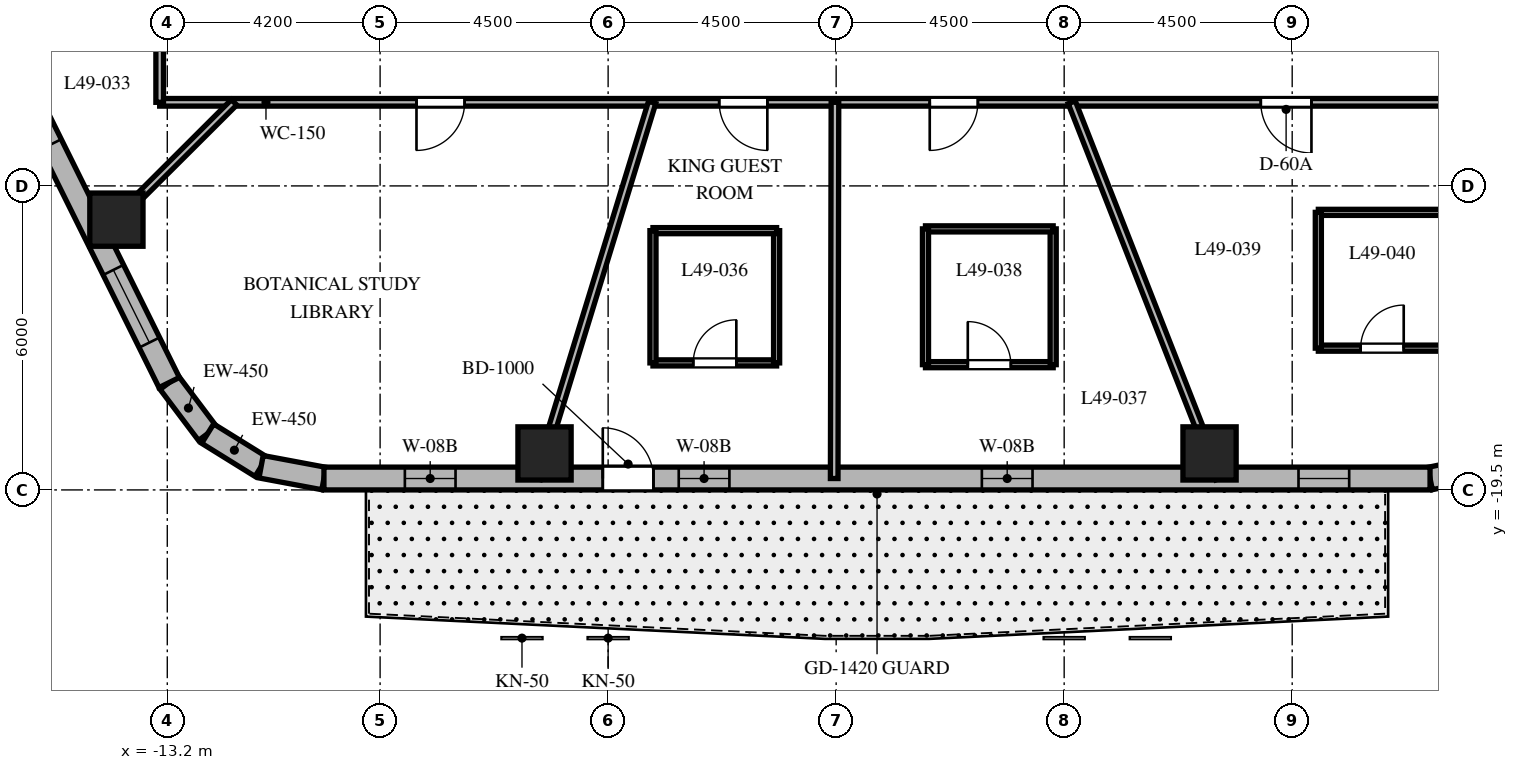
"""IFC4 building model, lengths in metres.
Left out: names, types, materials, properties, quantities, classifications, styles, units other than length and angle.
Written with IfcOpenShell. Run it as: python <this file> out.ifc"""

import sys

from ifc_helpers import new_model, si_unit, direction, frame, frame_2d, origin, origin_2d, place, context, subcontext, project, spatial, rectangle, extrude, element, fill, save


model = new_model("IFC4")
c1 = context("Model", 3, precision=1e-05, world=origin(), true_north=direction((0.0, 1.0)))
c2 = subcontext(c1, "Body", "Model", "MODEL_VIEW")
j1 = project(units=[si_unit("LENGTHUNIT", "METRE"), si_unit("PLANEANGLEUNIT", "RADIAN")], contexts=[c1])
p1 = place(None, origin())
s1 = spatial("IfcSite", under=j1, at=p1, CompositionType="ELEMENT")
p2 = place(p1, origin())
s2 = spatial("IfcBuilding", under=s1, at=p2, CompositionType="ELEMENT")
p3 = place(p2, frame((0.0, 0.0, 197.8)))
s3 = spatial("IfcBuildingStorey", under=s2, at=p3, CompositionType="ELEMENT", Elevation=197.8)
for number, where, z_axis, x_axis in (
    (1, (-5.755, -18.78, 0.0), (0.0, 0.0, 1.0), (1.0, 0.0, 0.0)),
    (2, (7.369, -18.78, 0.0), (0.0, 0.0, 1.0), (1.0, 0.0, 0.0)),
    (3, (-14.204, -14.166, 0.0), (0.0, 0.0, 1.0), (1.0, 0.0, 0.0)),
):
    element("IfcColumn", number, at=place(p3, frame(where, z_axis=z_axis, x_axis=x_axis)), inside=s3, PredefinedType="COLUMN", context=c2, shape_type="SweptSolid", body=[
        extrude(rectangle(XDim=1.05, YDim=1.05, at=origin_2d()), origin(), (0.0, 0.0, 1.0), 3.7),
    ])
p4 = place(p3, frame((-13.162, -17.381, 0.0), z_axis=(0.0, 0.0, 1.0), x_axis=(0.601515770517, -0.798860925205, 0.0)))
e4 = element("IfcWall", 4, at=p4, inside=s3, PredefinedType="SOLIDWALL", context=c2, shape_type="SweptSolid", body=[
    extrude(rectangle(XDim=1.262, YDim=0.45, at=frame_2d((0.631, 0.0))), origin(), (0.0, 0.0, 1.0), 3.35),
])
p5 = place(p3, frame((-12.403, -18.389, 0.0), z_axis=(0.0, 0.0, 1.0), x_axis=(0.849795170926, -0.527113049991, 0.0)))
e5 = element("IfcWall", 5, at=p5, inside=s3, PredefinedType="SOLIDWALL", context=c2, shape_type="SweptSolid", body=[
    extrude(rectangle(XDim=1.241, YDim=0.45, at=frame_2d((0.62, 0.0))), origin(), (0.0, 0.0, 1.0), 3.35),
])
p6 = place(p3, frame((-11.349, -19.043, 0.0), z_axis=(0.0, 0.0, 1.0), x_axis=(0.982931267051, -0.183973161772, 0.0)))
e6 = element("IfcWall", 6, at=p6, inside=s3, PredefinedType="SOLIDWALL", context=c2, shape_type="SweptSolid", body=[
    extrude(rectangle(XDim=1.262, YDim=0.45, at=frame_2d((0.631, 0.0))), origin(), (0.0, 0.0, 1.0), 3.35),
])
p7 = place(p3, frame((11.72, -19.275, 0.0), z_axis=(0.0, 0.0, 1.0), x_axis=(0.97893106758, 0.204191001093, 0.0)))
e7 = element("IfcWall", 7, at=p7, inside=s3, PredefinedType="SOLIDWALL", context=c2, shape_type="SweptSolid", body=[
    extrude(rectangle(XDim=1.4, YDim=0.45, at=frame_2d((0.7, 0.0))), origin(), (0.0, 0.0, 1.0), 3.35),
])
p8 = place(p3, frame((-10.108, -19.275, 0.0), z_axis=(0.0, 0.0, 1.0), x_axis=(1.0, 0.0, 0.0)))
e8 = element("IfcWall", 8, at=p8, inside=s3, PredefinedType="SOLIDWALL", context=c2, shape_type="SweptSolid", body=[
    extrude(rectangle(XDim=21.829, YDim=0.45, at=frame_2d((10.915, 0.0))), origin(), (0.0, 0.0, 1.0), 3.35),
])
p9 = place(p8, frame((5.503, 0.0, 0.0)))
e9 = element("IfcOpeningElement", 9, at=p9, cuts=e8, PredefinedType="OPENING", context=c2, shape_type="SweptSolid", body=[
    extrude(rectangle(XDim=1.0, YDim=2.15, at=frame_2d((0.5, 1.075))), frame((0.0, 0.235, 0.0), z_axis=(0.0, -1.0, 0.0), x_axis=(1.0, 0.0, 0.0)), (0.0, 0.0, 1.0), 0.47),
])
p10 = place(p8, frame((1.597, 0.0, 0.8)))
e10 = element("IfcOpeningElement", 10, at=p10, cuts=e8, PredefinedType="OPENING", context=c2, shape_type="SweptSolid", body=[
    extrude(rectangle(XDim=1.0, YDim=1.35, at=frame_2d((0.5, 0.675))), frame((0.0, 0.235, 0.0), z_axis=(0.0, -1.0, 0.0), x_axis=(1.0, 0.0, 0.0)), (0.0, 0.0, 1.0), 0.47),
])
p11 = place(p8, frame((7.002, 0.0, 0.8)))
e11 = element("IfcOpeningElement", 11, at=p11, cuts=e8, PredefinedType="OPENING", context=c2, shape_type="SweptSolid", body=[
    extrude(rectangle(XDim=1.0, YDim=1.35, at=frame_2d((0.5, 0.675))), frame((0.0, 0.235, 0.0), z_axis=(0.0, -1.0, 0.0), x_axis=(1.0, 0.0, 0.0)), (0.0, 0.0, 1.0), 0.47),
])
p12 = place(p8, frame((12.984, 0.0, 0.8)))
e12 = element("IfcOpeningElement", 12, at=p12, cuts=e8, PredefinedType="OPENING", context=c2, shape_type="SweptSolid", body=[
    extrude(rectangle(XDim=1.0, YDim=1.35, at=frame_2d((0.5, 0.675))), frame((0.0, 0.235, 0.0), z_axis=(0.0, -1.0, 0.0), x_axis=(1.0, 0.0, 0.0)), (0.0, 0.0, 1.0), 0.47),
])
p13 = place(p8, frame((19.233, 0.0, 0.8)))
e13 = element("IfcOpeningElement", 13, at=p13, cuts=e8, PredefinedType="OPENING", context=c2, shape_type="SweptSolid", body=[
    extrude(rectangle(XDim=1.0, YDim=1.35, at=frame_2d((0.5, 0.675))), frame((0.0, 0.235, 0.0), z_axis=(0.0, -1.0, 0.0), x_axis=(1.0, 0.0, 0.0)), (0.0, 0.0, 1.0), 0.47),
])
p14 = place(p3, frame((-20.618, -2.344, 0.0), z_axis=(0.0, 0.0, 1.0), x_axis=(0.444243691097, -0.895905990002, 0.0)))
e14 = element("IfcWall", 14, at=p14, inside=s3, PredefinedType="SOLIDWALL", context=c2, shape_type="SweptSolid", body=[
    extrude(rectangle(XDim=16.784, YDim=0.45, at=frame_2d((8.392, 0.0))), origin(), (0.0, 0.0, 1.0), 3.35),
])
p15 = place(p14, frame((0.931, 0.0, 0.8)))
e15 = element("IfcOpeningElement", 15, at=p15, cuts=e14, PredefinedType="OPENING", context=c2, shape_type="SweptSolid", body=[
    extrude(rectangle(XDim=1.6, YDim=1.75, at=frame_2d((0.8, 0.875))), frame((0.0, 0.235, 0.0), z_axis=(0.0, -1.0, 0.0), x_axis=(1.0, 0.0, 0.0)), (0.0, 0.0, 1.0), 0.47),
])
p16 = place(p14, frame((5.245, 0.0, 0.8)))
e16 = element("IfcOpeningElement", 16, at=p16, cuts=e14, PredefinedType="OPENING", context=c2, shape_type="SweptSolid", body=[
    extrude(rectangle(XDim=1.6, YDim=1.75, at=frame_2d((0.8, 0.875))), frame((0.0, 0.235, 0.0), z_axis=(0.0, -1.0, 0.0), x_axis=(1.0, 0.0, 0.0)), (0.0, 0.0, 1.0), 0.47),
])
p17 = place(p14, frame((9.936, 0.0, 0.8)))
e17 = element("IfcOpeningElement", 17, at=p17, cuts=e14, PredefinedType="OPENING", context=c2, shape_type="SweptSolid", body=[
    extrude(rectangle(XDim=1.6, YDim=1.75, at=frame_2d((0.8, 0.875))), frame((0.0, 0.235, 0.0), z_axis=(0.0, -1.0, 0.0), x_axis=(1.0, 0.0, 0.0)), (0.0, 0.0, 1.0), 0.47),
])
p18 = place(p14, frame((14.303, 0.0, 0.8)))
e18 = element("IfcOpeningElement", 18, at=p18, cuts=e14, PredefinedType="OPENING", context=c2, shape_type="SweptSolid", body=[
    extrude(rectangle(XDim=1.6, YDim=1.75, at=frame_2d((0.8, 0.875))), frame((0.0, 0.235, 0.0), z_axis=(0.0, -1.0, 0.0), x_axis=(1.0, 0.0, 0.0)), (0.0, 0.0, 1.0), 0.47),
])
p19 = place(p3, frame((13.35, -11.85, 0.0), z_axis=(0.0, 0.0, 1.0), x_axis=(-1.0, 0.0, 0.0)))
e19 = element("IfcWall", 19, at=p19, inside=s3, PredefinedType="PARTITIONING", context=c2, shape_type="SweptSolid", body=[
    extrude(rectangle(XDim=26.7, YDim=0.15, at=frame_2d((13.35, 0.0))), origin(), (0.0, 0.0, 1.0), 2.14),
])
p20 = place(p19, frame((20.682, 0.0, 0.0)))
e20 = element("IfcOpeningElement", 20, at=p20, cuts=e19, PredefinedType="OPENING", context=c2, shape_type="SweptSolid", body=[
    extrude(rectangle(XDim=0.95, YDim=2.03, at=frame_2d((0.475, 1.015))), frame((0.0, 0.085, 0.0), z_axis=(0.0, -1.0, 0.0), x_axis=(1.0, 0.0, 0.0)), (0.0, 0.0, 1.0), 0.17),
])
p21 = place(p19, frame((14.708, 0.0, 0.0)))
e21 = element("IfcOpeningElement", 21, at=p21, cuts=e19, PredefinedType="OPENING", context=c2, shape_type="SweptSolid", body=[
    extrude(rectangle(XDim=0.95, YDim=2.03, at=frame_2d((0.475, 1.015))), frame((0.0, 0.085, 0.0), z_axis=(0.0, -1.0, 0.0), x_axis=(1.0, 0.0, 0.0)), (0.0, 0.0, 1.0), 0.17),
])
p22 = place(p19, frame((10.553, 0.0, 0.0)))
e22 = element("IfcOpeningElement", 22, at=p22, cuts=e19, PredefinedType="OPENING", context=c2, shape_type="SweptSolid", body=[
    extrude(rectangle(XDim=0.95, YDim=2.03, at=frame_2d((0.475, 1.015))), frame((0.0, 0.085, 0.0), z_axis=(0.0, -1.0, 0.0), x_axis=(1.0, 0.0, 0.0)), (0.0, 0.0, 1.0), 0.17),
])
p23 = place(p19, frame((3.97, 0.0, 0.0)))
e23 = element("IfcOpeningElement", 23, at=p23, cuts=e19, PredefinedType="OPENING", context=c2, shape_type="SweptSolid", body=[
    extrude(rectangle(XDim=1.0, YDim=2.03, at=frame_2d((0.5, 1.015))), frame((0.0, 0.085, 0.0), z_axis=(0.0, -1.0, 0.0), x_axis=(1.0, 0.0, 0.0)), (0.0, 0.0, 1.0), 0.17),
])
p24 = place(p3, frame((-13.35, -11.85, 0.0), z_axis=(0.0, 0.0, 1.0), x_axis=(0.0, 1.0, 0.0)))
e24 = element("IfcWall", 24, at=p24, inside=s3, PredefinedType="PARTITIONING", context=c2, shape_type="SweptSolid", body=[
    extrude(rectangle(XDim=23.7, YDim=0.15, at=frame_2d((11.85, 0.0))), origin(), (0.0, 0.0, 1.0), 2.79),
])
p25 = place(p24, frame((20.136, 0.0, 0.0)))
e25 = element("IfcOpeningElement", 25, at=p25, cuts=e24, PredefinedType="OPENING", context=c2, shape_type="SweptSolid", body=[
    extrude(rectangle(XDim=0.9, YDim=2.03, at=frame_2d((0.45, 1.015))), frame((0.0, 0.085, 0.0), z_axis=(0.0, -1.0, 0.0), x_axis=(1.0, 0.0, 0.0)), (0.0, 0.0, 1.0), 0.17),
])
p26 = place(p24, frame((15.551, 0.0, 0.0)))
e26 = element("IfcOpeningElement", 26, at=p26, cuts=e24, PredefinedType="OPENING", context=c2, shape_type="SweptSolid", body=[
    extrude(rectangle(XDim=0.9, YDim=2.03, at=frame_2d((0.45, 1.015))), frame((0.0, 0.085, 0.0), z_axis=(0.0, -1.0, 0.0), x_axis=(1.0, 0.0, 0.0)), (0.0, 0.0, 1.0), 0.17),
])
p27 = place(p24, frame((10.751, 0.0, 0.0)))
e27 = element("IfcOpeningElement", 27, at=p27, cuts=e24, PredefinedType="OPENING", context=c2, shape_type="SweptSolid", body=[
    extrude(rectangle(XDim=0.95, YDim=2.03, at=frame_2d((0.475, 1.015))), frame((0.0, 0.085, 0.0), z_axis=(0.0, -1.0, 0.0), x_axis=(1.0, 0.0, 0.0)), (0.0, 0.0, 1.0), 0.17),
])
p28 = place(p24, frame((5.677, 0.0, 0.0)))
e28 = element("IfcOpeningElement", 28, at=p28, cuts=e24, PredefinedType="OPENING", context=c2, shape_type="SweptSolid", body=[
    extrude(rectangle(XDim=0.9, YDim=2.03, at=frame_2d((0.45, 1.015))), frame((0.0, 0.085, 0.0), z_axis=(0.0, -1.0, 0.0), x_axis=(1.0, 0.0, 0.0)), (0.0, 0.0, 1.0), 0.17),
])
p29 = place(p24, frame((1.721, 0.0, 0.0)))
e29 = element("IfcOpeningElement", 29, at=p29, cuts=e24, PredefinedType="OPENING", context=c2, shape_type="SweptSolid", body=[
    extrude(rectangle(XDim=0.9, YDim=2.03, at=frame_2d((0.45, 1.015))), frame((0.0, 0.085, 0.0), z_axis=(0.0, -1.0, 0.0), x_axis=(1.0, 0.0, 0.0)), (0.0, 0.0, 1.0), 0.17),
])
p30 = place(p3, frame((-11.882, -11.85, 0.0), z_axis=(0.0, 0.0, 1.0), x_axis=(-0.708037373639, -0.706174962407, 0.0)))
e30 = element("IfcWall", 30, at=p30, inside=s3, PredefinedType="PARTITIONING", context=c2, shape_type="SweptSolid", body=[
    extrude(rectangle(XDim=3.802, YDim=0.15, at=frame_2d((1.901, 0.0))), origin(), (0.0, 0.0, 1.0), 2.59),
])
p31 = place(p3, frame((-3.631, -11.85, 0.0), z_axis=(0.0, 0.0, 1.0), x_axis=(-0.293007573338, -0.956110120209, 0.0)))
e31 = element("IfcWall", 31, at=p31, inside=s3, PredefinedType="PARTITIONING", context=c2, shape_type="SweptSolid", body=[
    extrude(rectangle(XDim=7.766, YDim=0.15, at=frame_2d((3.883, 0.0))), origin(), (0.0, 0.0, 1.0), 2.14),
])
p32 = place(p3, frame((-0.024, -11.85, 0.0), z_axis=(0.0, 0.0, 1.0), x_axis=(-0.001972901592, -0.999998053828, 0.0)))
e32 = element("IfcWall", 32, at=p32, inside=s3, PredefinedType="PARTITIONING", context=c2, shape_type="SweptSolid", body=[
    extrude(rectangle(XDim=7.425, YDim=0.15, at=frame_2d((3.712, 0.0))), origin(), (0.0, 0.0, 1.0), 2.59),
])
p33 = place(p3, frame((4.65, -11.85, 0.0), z_axis=(0.0, 0.0, 1.0), x_axis=(0.365265947993, -0.930903210456, 0.0)))
e33 = element("IfcWall", 33, at=p33, inside=s3, PredefinedType="PARTITIONING", context=c2, shape_type="SweptSolid", body=[
    extrude(rectangle(XDim=7.976, YDim=0.15, at=frame_2d((3.988, 0.0))), origin(), (0.0, 0.0, 1.0), 2.14),
])
p34 = place(p3, frame((-3.615, -16.993, 0.0), z_axis=(0.0, 0.0, 1.0), x_axis=(1.0, 0.0, 0.0)))
e34 = element("IfcWall", 34, at=p34, inside=s3, PredefinedType="PARTITIONING", context=c2, shape_type="SweptSolid", body=[
    extrude(rectangle(XDim=2.44, YDim=0.12, at=frame_2d((1.22, 0.0))), origin(), (0.0, 0.0, 1.0), 3.35),
])
p35 = place(p34, frame((0.795, 0.0, 0.0)))
e35 = element("IfcOpeningElement", 35, at=p35, cuts=e34, PredefinedType="OPENING", context=c2, shape_type="SweptSolid", body=[
    extrude(rectangle(XDim=0.85, YDim=2.03, at=frame_2d((0.425, 1.015))), frame((0.0, 0.07, 0.0), z_axis=(0.0, -1.0, 0.0), x_axis=(1.0, 0.0, 0.0)), (0.0, 0.0, 1.0), 0.14),
])
p36 = place(p3, frame((-1.175, -16.993, 0.0), z_axis=(0.0, 0.0, 1.0), x_axis=(0.0, 1.0, 0.0)))
e36 = element("IfcWall", 36, at=p36, inside=s3, PredefinedType="PARTITIONING", context=c2, shape_type="SweptSolid", body=[
    extrude(rectangle(XDim=2.61, YDim=0.12, at=frame_2d((1.305, 0.0))), origin(), (0.0, 0.0, 1.0), 2.791),
])
p37 = place(p3, frame((-1.175, -14.383, 0.0), z_axis=(0.0, 0.0, 1.0), x_axis=(-1.0, 0.0, 0.0)))
e37 = element("IfcWall", 37, at=p37, inside=s3, PredefinedType="PARTITIONING", context=c2, shape_type="SweptSolid", body=[
    extrude(rectangle(XDim=2.44, YDim=0.12, at=frame_2d((1.22, 0.0))), origin(), (0.0, 0.0, 1.0), 3.35),
])
p38 = place(p3, frame((-3.615, -14.383, 0.0), z_axis=(0.0, 0.0, 1.0), x_axis=(0.0, -1.0, 0.0)))
e38 = element("IfcWall", 38, at=p38, inside=s3, PredefinedType="PARTITIONING", context=c2, shape_type="SweptSolid", body=[
    extrude(rectangle(XDim=2.61, YDim=0.12, at=frame_2d((1.305, 0.0))), origin(), (0.0, 0.0, 1.0), 2.791),
])
p39 = place(p3, frame((1.763, -17.028, 0.0), z_axis=(0.0, 0.0, 1.0), x_axis=(1.0, 0.0, 0.0)))
e39 = element("IfcWall", 39, at=p39, inside=s3, PredefinedType="PARTITIONING", context=c2, shape_type="SweptSolid", body=[
    extrude(rectangle(XDim=2.52, YDim=0.12, at=frame_2d((1.26, 0.0))), origin(), (0.0, 0.0, 1.0), 2.14),
])
p40 = place(p39, frame((0.835, 0.0, 0.0)))
e40 = element("IfcOpeningElement", 40, at=p40, cuts=e39, PredefinedType="OPENING", context=c2, shape_type="SweptSolid", body=[
    extrude(rectangle(XDim=0.85, YDim=2.03, at=frame_2d((0.425, 1.015))), frame((0.0, 0.07, 0.0), z_axis=(0.0, -1.0, 0.0), x_axis=(1.0, 0.0, 0.0)), (0.0, 0.0, 1.0), 0.14),
])
p41 = place(p3, frame((4.283, -17.028, 0.0), z_axis=(0.0, 0.0, 1.0), x_axis=(0.0, 1.0, 0.0)))
e41 = element("IfcWall", 41, at=p41, inside=s3, PredefinedType="PARTITIONING", context=c2, shape_type="SweptSolid", body=[
    extrude(rectangle(XDim=2.68, YDim=0.12, at=frame_2d((1.34, 0.0))), origin(), (0.0, 0.0, 1.0), 2.14),
])
p42 = place(p3, frame((4.283, -14.348, 0.0), z_axis=(0.0, 0.0, 1.0), x_axis=(-1.0, 0.0, 0.0)))
e42 = element("IfcWall", 42, at=p42, inside=s3, PredefinedType="PARTITIONING", context=c2, shape_type="SweptSolid", body=[
    extrude(rectangle(XDim=2.52, YDim=0.12, at=frame_2d((1.26, 0.0))), origin(), (0.0, 0.0, 1.0), 2.14),
])
p43 = place(p3, frame((1.763, -14.348, 0.0), z_axis=(0.0, 0.0, 1.0), x_axis=(0.0, -1.0, 0.0)))
e43 = element("IfcWall", 43, at=p43, inside=s3, PredefinedType="PARTITIONING", context=c2, shape_type="SweptSolid", body=[
    extrude(rectangle(XDim=2.68, YDim=0.12, at=frame_2d((1.34, 0.0))), origin(), (0.0, 0.0, 1.0), 2.791),
])
p44 = place(p3, frame((9.516, -16.702, 0.0), z_axis=(0.0, 0.0, 1.0), x_axis=(1.0, 0.0, 0.0)))
e44 = element("IfcWall", 44, at=p44, inside=s3, PredefinedType="PARTITIONING", context=c2, shape_type="SweptSolid", body=[
    extrude(rectangle(XDim=2.52, YDim=0.12, at=frame_2d((1.26, 0.0))), origin(), (0.0, 0.0, 1.0), 2.59),
])
p45 = place(p44, frame((0.835, 0.0, 0.0)))
e45 = element("IfcOpeningElement", 45, at=p45, cuts=e44, PredefinedType="OPENING", context=c2, shape_type="SweptSolid", body=[
    extrude(rectangle(XDim=0.85, YDim=2.03, at=frame_2d((0.425, 1.015))), frame((0.0, 0.07, 0.0), z_axis=(0.0, -1.0, 0.0), x_axis=(1.0, 0.0, 0.0)), (0.0, 0.0, 1.0), 0.14),
])
p46 = place(p3, frame((12.036, -14.022, 0.0), z_axis=(0.0, 0.0, 1.0), x_axis=(-1.0, 0.0, 0.0)))
e46 = element("IfcWall", 46, at=p46, inside=s3, PredefinedType="PARTITIONING", context=c2, shape_type="SweptSolid", body=[
    extrude(rectangle(XDim=2.52, YDim=0.12, at=frame_2d((1.26, 0.0))), origin(), (0.0, 0.0, 1.0), 2.876),
])
p47 = place(p3, frame((9.516, -14.022, 0.0), z_axis=(0.0, 0.0, 1.0), x_axis=(0.0, -1.0, 0.0)))
e47 = element("IfcWall", 47, at=p47, inside=s3, PredefinedType="PARTITIONING", context=c2, shape_type="SweptSolid", body=[
    extrude(rectangle(XDim=2.68, YDim=0.12, at=frame_2d((1.34, 0.0))), origin(), (0.0, 0.0, 1.0), 2.876),
])
p48 = place(p9, origin())
e48 = element("IfcDoor", 48, at=p48, inside=s3, OperationType="SINGLE_SWING_LEFT", PredefinedType="DOOR", context=c2, shape_type="SweptSolid", body=[
    extrude(rectangle(XDim=1.0, YDim=2.15, at=frame_2d((0.5, 1.075))), frame((0.0, 0.025, 0.0), z_axis=(0.0, -1.0, 0.0), x_axis=(1.0, 0.0, 0.0)), (0.0, 0.0, 1.0), 0.05),
])
fill(e9, e48)
p49 = place(p10, origin())
e49 = element("IfcWindow", 49, at=p49, inside=s3, PartitioningType="SINGLE_PANEL", PredefinedType="WINDOW", context=c2, shape_type="SweptSolid", body=[
    extrude(rectangle(XDim=1.0, YDim=1.35, at=frame_2d((0.5, 0.675))), frame((0.0, 0.03, 0.0), z_axis=(0.0, -1.0, 0.0), x_axis=(1.0, 0.0, 0.0)), (0.0, 0.0, 1.0), 0.06),
])
fill(e10, e49)
p50 = place(p11, origin())
e50 = element("IfcWindow", 50, at=p50, inside=s3, PartitioningType="SINGLE_PANEL", PredefinedType="WINDOW", context=c2, shape_type="SweptSolid", body=[
    extrude(rectangle(XDim=1.0, YDim=1.35, at=frame_2d((0.5, 0.675))), frame((0.0, 0.03, 0.0), z_axis=(0.0, -1.0, 0.0), x_axis=(1.0, 0.0, 0.0)), (0.0, 0.0, 1.0), 0.06),
])
fill(e11, e50)
p51 = place(p12, origin())
e51 = element("IfcWindow", 51, at=p51, inside=s3, PartitioningType="SINGLE_PANEL", PredefinedType="WINDOW", context=c2, shape_type="SweptSolid", body=[
    extrude(rectangle(XDim=1.0, YDim=1.35, at=frame_2d((0.5, 0.675))), frame((0.0, 0.03, 0.0), z_axis=(0.0, -1.0, 0.0), x_axis=(1.0, 0.0, 0.0)), (0.0, 0.0, 1.0), 0.06),
])
fill(e12, e51)
p52 = place(p13, origin())
e52 = element("IfcWindow", 52, at=p52, inside=s3, PartitioningType="SINGLE_PANEL", PredefinedType="WINDOW", context=c2, shape_type="SweptSolid", body=[
    extrude(rectangle(XDim=1.0, YDim=1.35, at=frame_2d((0.5, 0.675))), frame((0.0, 0.03, 0.0), z_axis=(0.0, -1.0, 0.0), x_axis=(1.0, 0.0, 0.0)), (0.0, 0.0, 1.0), 0.06),
])
fill(e13, e52)
p53 = place(p17, origin())
e53 = element("IfcWindow", 53, at=p53, inside=s3, PartitioningType="SINGLE_PANEL", PredefinedType="WINDOW", context=c2, shape_type="SweptSolid", body=[
    extrude(rectangle(XDim=1.6, YDim=1.75, at=frame_2d((0.8, 0.875))), frame((0.0, 0.03, 0.0), z_axis=(0.0, -1.0, 0.0), x_axis=(1.0, 0.0, 0.0)), (0.0, 0.0, 1.0), 0.06),
])
fill(e17, e53)
p54 = place(p18, origin())
e54 = element("IfcWindow", 54, at=p54, inside=s3, PartitioningType="SINGLE_PANEL", PredefinedType="WINDOW", context=c2, shape_type="SweptSolid", body=[
    extrude(rectangle(XDim=1.6, YDim=1.75, at=frame_2d((0.8, 0.875))), frame((0.0, 0.03, 0.0), z_axis=(0.0, -1.0, 0.0), x_axis=(1.0, 0.0, 0.0)), (0.0, 0.0, 1.0), 0.06),
])
fill(e18, e54)
p55 = place(p20, origin())
e55 = element("IfcDoor", 55, at=p55, inside=s3, OperationType="SINGLE_SWING_RIGHT", PredefinedType="DOOR", context=c2, shape_type="SweptSolid", body=[
    extrude(rectangle(XDim=0.95, YDim=2.03, at=frame_2d((0.475, 1.015))), frame((0.0, 0.025, 0.0), z_axis=(0.0, -1.0, 0.0), x_axis=(1.0, 0.0, 0.0)), (0.0, 0.0, 1.0), 0.05),
])
fill(e20, e55)
p56 = place(p21, origin())
e56 = element("IfcDoor", 56, at=p56, inside=s3, OperationType="SINGLE_SWING_LEFT", PredefinedType="DOOR", context=c2, shape_type="SweptSolid", body=[
    extrude(rectangle(XDim=0.95, YDim=2.03, at=frame_2d((0.475, 1.015))), frame((0.0, 0.025, 0.0), z_axis=(0.0, -1.0, 0.0), x_axis=(1.0, 0.0, 0.0)), (0.0, 0.0, 1.0), 0.05),
])
fill(e21, e56)
p57 = place(p35, origin())
e57 = element("IfcDoor", 57, at=p57, inside=s3, OperationType="SINGLE_SWING_RIGHT", PredefinedType="DOOR", context=c2, shape_type="SweptSolid", body=[
    extrude(rectangle(XDim=0.85, YDim=2.03, at=frame_2d((0.425, 1.015))), frame((0.0, 0.025, 0.0), z_axis=(0.0, -1.0, 0.0), x_axis=(1.0, 0.0, 0.0)), (0.0, 0.0, 1.0), 0.05),
])
fill(e35, e57)
p58 = place(p22, origin())
e58 = element("IfcDoor", 58, at=p58, inside=s3, OperationType="SINGLE_SWING_RIGHT", PredefinedType="DOOR", context=c2, shape_type="SweptSolid", body=[
    extrude(rectangle(XDim=0.95, YDim=2.03, at=frame_2d((0.475, 1.015))), frame((0.0, 0.025, 0.0), z_axis=(0.0, -1.0, 0.0), x_axis=(1.0, 0.0, 0.0)), (0.0, 0.0, 1.0), 0.05),
])
fill(e22, e58)
p59 = place(p40, origin())
e59 = element("IfcDoor", 59, at=p59, inside=s3, OperationType="SINGLE_SWING_LEFT", PredefinedType="DOOR", context=c2, shape_type="SweptSolid", body=[
    extrude(rectangle(XDim=0.85, YDim=2.03, at=frame_2d((0.425, 1.015))), frame((0.0, 0.025, 0.0), z_axis=(0.0, -1.0, 0.0), x_axis=(1.0, 0.0, 0.0)), (0.0, 0.0, 1.0), 0.05),
])
fill(e40, e59)
p60 = place(p23, origin())
e60 = element("IfcDoor", 60, at=p60, inside=s3, OperationType="SINGLE_SWING_LEFT", PredefinedType="DOOR", context=c2, shape_type="SweptSolid", body=[
    extrude(rectangle(XDim=1.0, YDim=2.03, at=frame_2d((0.5, 1.015))), frame((0.0, 0.025, 0.0), z_axis=(0.0, -1.0, 0.0), x_axis=(1.0, 0.0, 0.0)), (0.0, 0.0, 1.0), 0.05),
])
fill(e23, e60)
p61 = place(p45, origin())
e61 = element("IfcDoor", 61, at=p61, inside=s3, OperationType="SINGLE_SWING_RIGHT", PredefinedType="DOOR", context=c2, shape_type="SweptSolid", body=[
    extrude(rectangle(XDim=0.85, YDim=2.03, at=frame_2d((0.425, 1.015))), frame((0.0, 0.025, 0.0), z_axis=(0.0, -1.0, 0.0), x_axis=(1.0, 0.0, 0.0)), (0.0, 0.0, 1.0), 0.05),
])
fill(e45, e61)
save(model, sys.argv[1])
